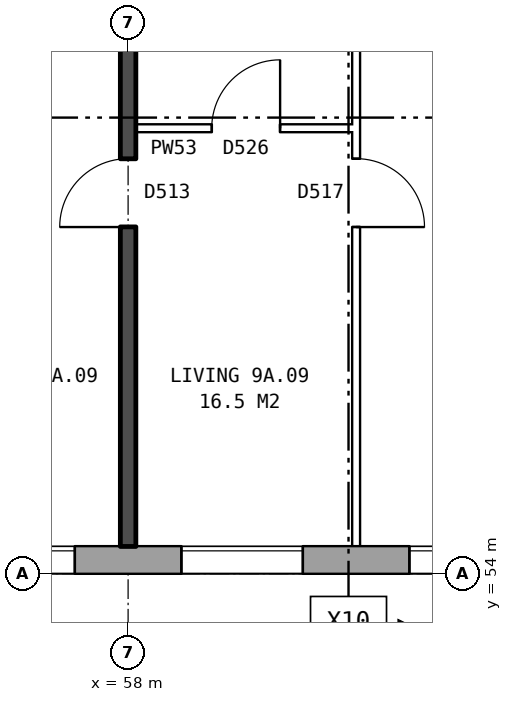
"""IFC4 building model, lengths in metres.
Left out: names, types, materials, properties, quantities, classifications, styles, units other than length and angle.
Written with IfcOpenShell. Run it as: python <this file> out.ifc"""

import sys

from ifc_helpers import new_model, si_unit, direction, frame, frame_2d, origin, place, context, subcontext, project, spatial, rectangle, extrude, element, fill, save


model = new_model("IFC4")
c1 = context("Model", 3, precision=1e-05, world=origin(), true_north=direction((0.0, 1.0)))
c2 = subcontext(c1, "Body", "Model", "MODEL_VIEW")
j1 = project(units=[si_unit("LENGTHUNIT", "METRE"), si_unit("PLANEANGLEUNIT", "RADIAN")], contexts=[c1])
p1 = place(None, origin())
s1 = spatial("IfcSite", under=j1, at=p1, CompositionType="ELEMENT")
p2 = place(p1, origin())
s2 = spatial("IfcBuilding", under=s1, at=p2, CompositionType="ELEMENT")
p3 = place(p2, frame((0.0, 0.0, 35.0)))
s3 = spatial("IfcBuildingStorey", under=s2, at=p3, CompositionType="ELEMENT", Elevation=35.0)
p4 = place(p3, frame((22.825, 54.18, 0.0), z_axis=(0.0, 0.0, 1.0), x_axis=(1.0, 0.0, 0.0)))
e1 = element("IfcWall", 1, at=p4, inside=s3, PredefinedType="STANDARD", context=c2, shape_type="SweptSolid", body=[
    extrude(rectangle(XDim=50.101, YDim=0.36, at=frame_2d((25.05, 0.0))), origin(), (0.0, 0.0, 1.0), 2.85),
])
p5 = place(p4, frame((2.875, 0.0, 0.8)))
e2 = element("IfcOpeningElement", 2, at=p5, cuts=e1, PredefinedType="OPENING", context=c2, shape_type="SweptSolid", body=[
    extrude(rectangle(XDim=1.6, YDim=1.8, at=frame_2d((0.8, 0.9))), frame((0.0, 0.19, 0.0), z_axis=(0.0, -1.0, 0.0), x_axis=(1.0, 0.0, 0.0)), (0.0, 0.0, 1.0), 0.38),
])
p6 = place(p4, frame((5.875, 0.0, 0.8)))
e3 = element("IfcOpeningElement", 3, at=p6, cuts=e1, PredefinedType="OPENING", context=c2, shape_type="SweptSolid", body=[
    extrude(rectangle(XDim=1.6, YDim=1.8, at=frame_2d((0.8, 0.9))), frame((0.0, 0.19, 0.0), z_axis=(0.0, -1.0, 0.0), x_axis=(1.0, 0.0, 0.0)), (0.0, 0.0, 1.0), 0.38),
])
p7 = place(p4, frame((8.875, 0.0, 0.8)))
e4 = element("IfcOpeningElement", 4, at=p7, cuts=e1, PredefinedType="OPENING", context=c2, shape_type="SweptSolid", body=[
    extrude(rectangle(XDim=1.6, YDim=1.8, at=frame_2d((0.8, 0.9))), frame((0.0, 0.19, 0.0), z_axis=(0.0, -1.0, 0.0), x_axis=(1.0, 0.0, 0.0)), (0.0, 0.0, 1.0), 0.38),
])
p8 = place(p4, frame((11.875, 0.0, 0.8)))
e5 = element("IfcOpeningElement", 5, at=p8, cuts=e1, PredefinedType="OPENING", context=c2, shape_type="SweptSolid", body=[
    extrude(rectangle(XDim=1.6, YDim=1.8, at=frame_2d((0.8, 0.9))), frame((0.0, 0.19, 0.0), z_axis=(0.0, -1.0, 0.0), x_axis=(1.0, 0.0, 0.0)), (0.0, 0.0, 1.0), 0.38),
])
p9 = place(p4, frame((14.875, 0.0, 0.8)))
e6 = element("IfcOpeningElement", 6, at=p9, cuts=e1, PredefinedType="OPENING", context=c2, shape_type="SweptSolid", body=[
    extrude(rectangle(XDim=1.6, YDim=1.8, at=frame_2d((0.8, 0.9))), frame((0.0, 0.19, 0.0), z_axis=(0.0, -1.0, 0.0), x_axis=(1.0, 0.0, 0.0)), (0.0, 0.0, 1.0), 0.38),
])
p10 = place(p4, frame((17.875, 0.0, 0.8)))
e7 = element("IfcOpeningElement", 7, at=p10, cuts=e1, PredefinedType="OPENING", context=c2, shape_type="SweptSolid", body=[
    extrude(rectangle(XDim=1.6, YDim=1.8, at=frame_2d((0.8, 0.9))), frame((0.0, 0.19, 0.0), z_axis=(0.0, -1.0, 0.0), x_axis=(1.0, 0.0, 0.0)), (0.0, 0.0, 1.0), 0.38),
])
p11 = place(p4, frame((19.775, 0.0, 0.8)))
e8 = element("IfcOpeningElement", 8, at=p11, cuts=e1, PredefinedType="OPENING", context=c2, shape_type="SweptSolid", body=[
    extrude(rectangle(XDim=1.6, YDim=1.8, at=frame_2d((0.8, 0.9))), frame((0.0, 0.19, 0.0), z_axis=(0.0, -1.0, 0.0), x_axis=(1.0, 0.0, 0.0)), (0.0, 0.0, 1.0), 0.38),
])
p12 = place(p4, frame((23.375, 0.0, 0.15)))
e9 = element("IfcOpeningElement", 9, at=p12, cuts=e1, PredefinedType="OPENING", context=c2, shape_type="SweptSolid", body=[
    extrude(rectangle(XDim=0.6, YDim=0.9, at=frame_2d((0.3, 0.45))), frame((0.0, 0.19, 0.0), z_axis=(0.0, -1.0, 0.0), x_axis=(1.0, 0.0, 0.0)), (0.0, 0.0, 1.0), 0.38),
])
p13 = place(p4, frame((27.275, 0.0, 1.7)))
e10 = element("IfcOpeningElement", 10, at=p13, cuts=e1, PredefinedType="OPENING", context=c2, shape_type="SweptSolid", body=[
    extrude(rectangle(XDim=0.6, YDim=0.9, at=frame_2d((0.3, 0.45))), frame((0.0, 0.19, 0.0), z_axis=(0.0, -1.0, 0.0), x_axis=(1.0, 0.0, 0.0)), (0.0, 0.0, 1.0), 0.38),
])
p14 = place(p4, frame((29.875, 0.0, 0.8)))
e11 = element("IfcOpeningElement", 11, at=p14, cuts=e1, PredefinedType="OPENING", context=c2, shape_type="SweptSolid", body=[
    extrude(rectangle(XDim=1.6, YDim=1.8, at=frame_2d((0.8, 0.9))), frame((0.0, 0.19, 0.0), z_axis=(0.0, -1.0, 0.0), x_axis=(1.0, 0.0, 0.0)), (0.0, 0.0, 1.0), 0.38),
])
p15 = place(p4, frame((32.875, 0.0, 0.8)))
e12 = element("IfcOpeningElement", 12, at=p15, cuts=e1, PredefinedType="OPENING", context=c2, shape_type="SweptSolid", body=[
    extrude(rectangle(XDim=1.6, YDim=1.8, at=frame_2d((0.8, 0.9))), frame((0.0, 0.19, 0.0), z_axis=(0.0, -1.0, 0.0), x_axis=(1.0, 0.0, 0.0)), (0.0, 0.0, 1.0), 0.38),
])
p16 = place(p4, frame((35.875, 0.0, 0.8)))
e13 = element("IfcOpeningElement", 13, at=p16, cuts=e1, PredefinedType="OPENING", context=c2, shape_type="SweptSolid", body=[
    extrude(rectangle(XDim=1.6, YDim=1.8, at=frame_2d((0.8, 0.9))), frame((0.0, 0.19, 0.0), z_axis=(0.0, -1.0, 0.0), x_axis=(1.0, 0.0, 0.0)), (0.0, 0.0, 1.0), 0.38),
])
p17 = place(p4, frame((38.875, 0.0, 0.8)))
e14 = element("IfcOpeningElement", 14, at=p17, cuts=e1, PredefinedType="OPENING", context=c2, shape_type="SweptSolid", body=[
    extrude(rectangle(XDim=1.6, YDim=1.8, at=frame_2d((0.8, 0.9))), frame((0.0, 0.19, 0.0), z_axis=(0.0, -1.0, 0.0), x_axis=(1.0, 0.0, 0.0)), (0.0, 0.0, 1.0), 0.38),
])
p18 = place(p4, frame((41.875, 0.0, 0.8)))
e15 = element("IfcOpeningElement", 15, at=p18, cuts=e1, PredefinedType="OPENING", context=c2, shape_type="SweptSolid", body=[
    extrude(rectangle(XDim=1.6, YDim=1.8, at=frame_2d((0.8, 0.9))), frame((0.0, 0.19, 0.0), z_axis=(0.0, -1.0, 0.0), x_axis=(1.0, 0.0, 0.0)), (0.0, 0.0, 1.0), 0.38),
])
p19 = place(p4, frame((44.875, 0.0, 0.8)))
e16 = element("IfcOpeningElement", 16, at=p19, cuts=e1, PredefinedType="OPENING", context=c2, shape_type="SweptSolid", body=[
    extrude(rectangle(XDim=1.6, YDim=1.8, at=frame_2d((0.8, 0.9))), frame((0.0, 0.19, 0.0), z_axis=(0.0, -1.0, 0.0), x_axis=(1.0, 0.0, 0.0)), (0.0, 0.0, 1.0), 0.38),
])
p20 = place(p4, frame((47.875, 0.0, 0.8)))
e17 = element("IfcOpeningElement", 17, at=p20, cuts=e1, PredefinedType="OPENING", context=c2, shape_type="SweptSolid", body=[
    extrude(rectangle(XDim=1.6, YDim=1.8, at=frame_2d((0.8, 0.9))), frame((0.0, 0.19, 0.0), z_axis=(0.0, -1.0, 0.0), x_axis=(1.0, 0.0, 0.0)), (0.0, 0.0, 1.0), 0.38),
])
p21 = place(p4, frame((21.675, 0.0, 1.4)))
e18 = element("IfcOpeningElement", 18, at=p21, cuts=e1, PredefinedType="OPENING", context=c2, shape_type="SweptSolid", body=[
    extrude(rectangle(XDim=0.6, YDim=1.2, at=frame_2d((0.3, 0.6))), frame((0.0, 0.19, 0.0), z_axis=(0.0, -1.0, 0.0), x_axis=(1.0, 0.0, 0.0)), (0.0, 0.0, 1.0), 0.38),
])
p22 = place(p4, frame((24.275, 0.0, 0.15)))
e19 = element("IfcOpeningElement", 19, at=p22, cuts=e1, PredefinedType="OPENING", context=c2, shape_type="SweptSolid", body=[
    extrude(rectangle(XDim=1.6, YDim=1.5, at=frame_2d((0.8, 0.75))), frame((0.0, 0.19, 0.0), z_axis=(0.0, -1.0, 0.0), x_axis=(1.0, 0.0, 0.0)), (0.0, 0.0, 1.0), 0.38),
])
p23 = place(p4, frame((28.175, 0.0, 1.1)))
e20 = element("IfcOpeningElement", 20, at=p23, cuts=e1, PredefinedType="OPENING", context=c2, shape_type="SweptSolid", body=[
    extrude(rectangle(XDim=0.8, YDim=1.5, at=frame_2d((0.4, 0.75))), frame((0.0, 0.19, 0.0), z_axis=(0.0, -1.0, 0.0), x_axis=(1.0, 0.0, 0.0)), (0.0, 0.0, 1.0), 0.38),
])
p24 = place(p3, frame((58.1, 59.86, 0.0), z_axis=(0.0, 0.0, 1.0), x_axis=(1.0, 0.0, 0.0)))
e21 = element("IfcWall", 21, at=p24, inside=s3, PredefinedType="PARTITIONING", context=c2, shape_type="SweptSolid", body=[
    extrude(rectangle(XDim=2.9, YDim=0.1, at=frame_2d((1.45, 0.0))), origin(), (0.0, 0.0, 1.0), 2.85),
])
p25 = place(p24, frame((1.0, 0.0, 0.0)))
e22 = element("IfcOpeningElement", 22, at=p25, cuts=e21, PredefinedType="OPENING", context=c2, shape_type="SweptSolid", body=[
    extrude(rectangle(XDim=0.9, YDim=2.1, at=frame_2d((0.45, 1.05))), frame((0.0, 0.06, 0.0), z_axis=(0.0, -1.0, 0.0), x_axis=(1.0, 0.0, 0.0)), (0.0, 0.0, 1.0), 0.12),
])
p26 = place(p3, frame((58.0, 54.36, 0.0), z_axis=(0.0, 0.0, 1.0), x_axis=(0.0, 1.0, 0.0)))
e23 = element("IfcWall", 23, at=p26, inside=s3, PredefinedType="SOLIDWALL", context=c2, shape_type="SweptSolid", body=[
    extrude(rectangle(XDim=14.44, YDim=0.2, at=frame_2d((7.22, 0.0))), origin(), (0.0, 0.0, 1.0), 2.85),
])
p27 = place(p26, frame((4.2, 0.0, 0.0)))
e24 = element("IfcOpeningElement", 24, at=p27, cuts=e23, PredefinedType="OPENING", context=c2, shape_type="SweptSolid", body=[
    extrude(rectangle(XDim=0.9, YDim=2.1, at=frame_2d((0.45, 1.05))), frame((0.0, 0.11, 0.0), z_axis=(0.0, -1.0, 0.0), x_axis=(1.0, 0.0, 0.0)), (0.0, 0.0, 1.0), 0.22),
])
p28 = place(p26, frame((13.14, 0.0, 0.0)))
e25 = element("IfcOpeningElement", 25, at=p28, cuts=e23, PredefinedType="OPENING", context=c2, shape_type="SweptSolid", body=[
    extrude(rectangle(XDim=0.9, YDim=2.1, at=frame_2d((0.45, 1.05))), frame((0.0, 0.11, 0.0), z_axis=(0.0, -1.0, 0.0), x_axis=(1.0, 0.0, 0.0)), (0.0, 0.0, 1.0), 0.22),
])
p29 = place(p3, frame((61.0, 54.36, 0.0), z_axis=(0.0, 0.0, 1.0), x_axis=(0.0, 1.0, 0.0)))
e26 = element("IfcWall", 26, at=p29, inside=s3, PredefinedType="PARTITIONING", context=c2, shape_type="SweptSolid", body=[
    extrude(rectangle(XDim=14.34, YDim=0.1, at=frame_2d((7.17, 0.0))), origin(), (0.0, 0.0, 1.0), 2.85),
])
p30 = place(p29, frame((4.2, 0.0, 0.0)))
e27 = element("IfcOpeningElement", 27, at=p30, cuts=e26, PredefinedType="OPENING", context=c2, shape_type="SweptSolid", body=[
    extrude(rectangle(XDim=0.9, YDim=2.1, at=frame_2d((0.45, 1.05))), frame((0.0, 0.06, 0.0), z_axis=(0.0, -1.0, 0.0), x_axis=(1.0, 0.0, 0.0)), (0.0, 0.0, 1.0), 0.12),
])
p31 = place(p29, frame((13.04, 0.0, 0.0)))
e28 = element("IfcOpeningElement", 28, at=p31, cuts=e26, PredefinedType="OPENING", context=c2, shape_type="SweptSolid", body=[
    extrude(rectangle(XDim=0.9, YDim=2.1, at=frame_2d((0.45, 1.05))), frame((0.0, 0.06, 0.0), z_axis=(0.0, -1.0, 0.0), x_axis=(1.0, 0.0, 0.0)), (0.0, 0.0, 1.0), 0.12),
])
p32 = place(p15, origin())
e29 = element("IfcWindow", 29, at=p32, inside=s3, PartitioningType="SINGLE_PANEL", PredefinedType="WINDOW", context=c2, shape_type="SweptSolid", body=[
    extrude(rectangle(XDim=1.6, YDim=1.8, at=frame_2d((0.8, 0.9))), frame((0.0, 0.15, 0.0), z_axis=(0.0, -1.0, 0.0), x_axis=(1.0, 0.0, 0.0)), (0.0, 0.0, 1.0), 0.06),
])
fill(e12, e29)
p33 = place(p16, origin())
e30 = element("IfcWindow", 30, at=p33, inside=s3, PartitioningType="SINGLE_PANEL", PredefinedType="WINDOW", context=c2, shape_type="SweptSolid", body=[
    extrude(rectangle(XDim=1.6, YDim=1.8, at=frame_2d((0.8, 0.9))), frame((0.0, 0.15, 0.0), z_axis=(0.0, -1.0, 0.0), x_axis=(1.0, 0.0, 0.0)), (0.0, 0.0, 1.0), 0.06),
])
fill(e13, e30)
p34 = place(p17, origin())
e31 = element("IfcWindow", 31, at=p34, inside=s3, PartitioningType="SINGLE_PANEL", PredefinedType="WINDOW", context=c2, shape_type="SweptSolid", body=[
    extrude(rectangle(XDim=1.6, YDim=1.8, at=frame_2d((0.8, 0.9))), frame((0.0, 0.15, 0.0), z_axis=(0.0, -1.0, 0.0), x_axis=(1.0, 0.0, 0.0)), (0.0, 0.0, 1.0), 0.06),
])
fill(e14, e31)
p35 = place(p30, frame((0.9, 0.0, 0.0), z_axis=(0.0, 0.0, 1.0), x_axis=(-1.0, 0.0, 0.0)))
e32 = element("IfcDoor", 32, at=p35, inside=s3, OperationType="SINGLE_SWING_RIGHT", PredefinedType="DOOR", context=c2, shape_type="SweptSolid", body=[
    extrude(rectangle(XDim=0.9, YDim=2.1, at=frame_2d((0.45, 1.05))), frame((0.0, 0.025, 0.0), z_axis=(0.0, -1.0, 0.0), x_axis=(1.0, 0.0, 0.0)), (0.0, 0.0, 1.0), 0.05),
])
fill(e27, e32)
p36 = place(p27, origin())
e33 = element("IfcDoor", 33, at=p36, inside=s3, OperationType="SINGLE_SWING_LEFT", PredefinedType="DOOR", context=c2, shape_type="SweptSolid", body=[
    extrude(rectangle(XDim=0.9, YDim=2.1, at=frame_2d((0.45, 1.05))), frame((0.0, 0.025, 0.0), z_axis=(0.0, -1.0, 0.0), x_axis=(1.0, 0.0, 0.0)), (0.0, 0.0, 1.0), 0.05),
])
fill(e24, e33)
p37 = place(p25, origin())
e34 = element("IfcDoor", 34, at=p37, inside=s3, OperationType="SINGLE_SWING_RIGHT", PredefinedType="DOOR", context=c2, shape_type="SweptSolid", body=[
    extrude(rectangle(XDim=0.9, YDim=2.1, at=frame_2d((0.45, 1.05))), frame((0.0, 0.025, 0.0), z_axis=(0.0, -1.0, 0.0), x_axis=(1.0, 0.0, 0.0)), (0.0, 0.0, 1.0), 0.05),
])
fill(e22, e34)
save(model, sys.argv[1])
